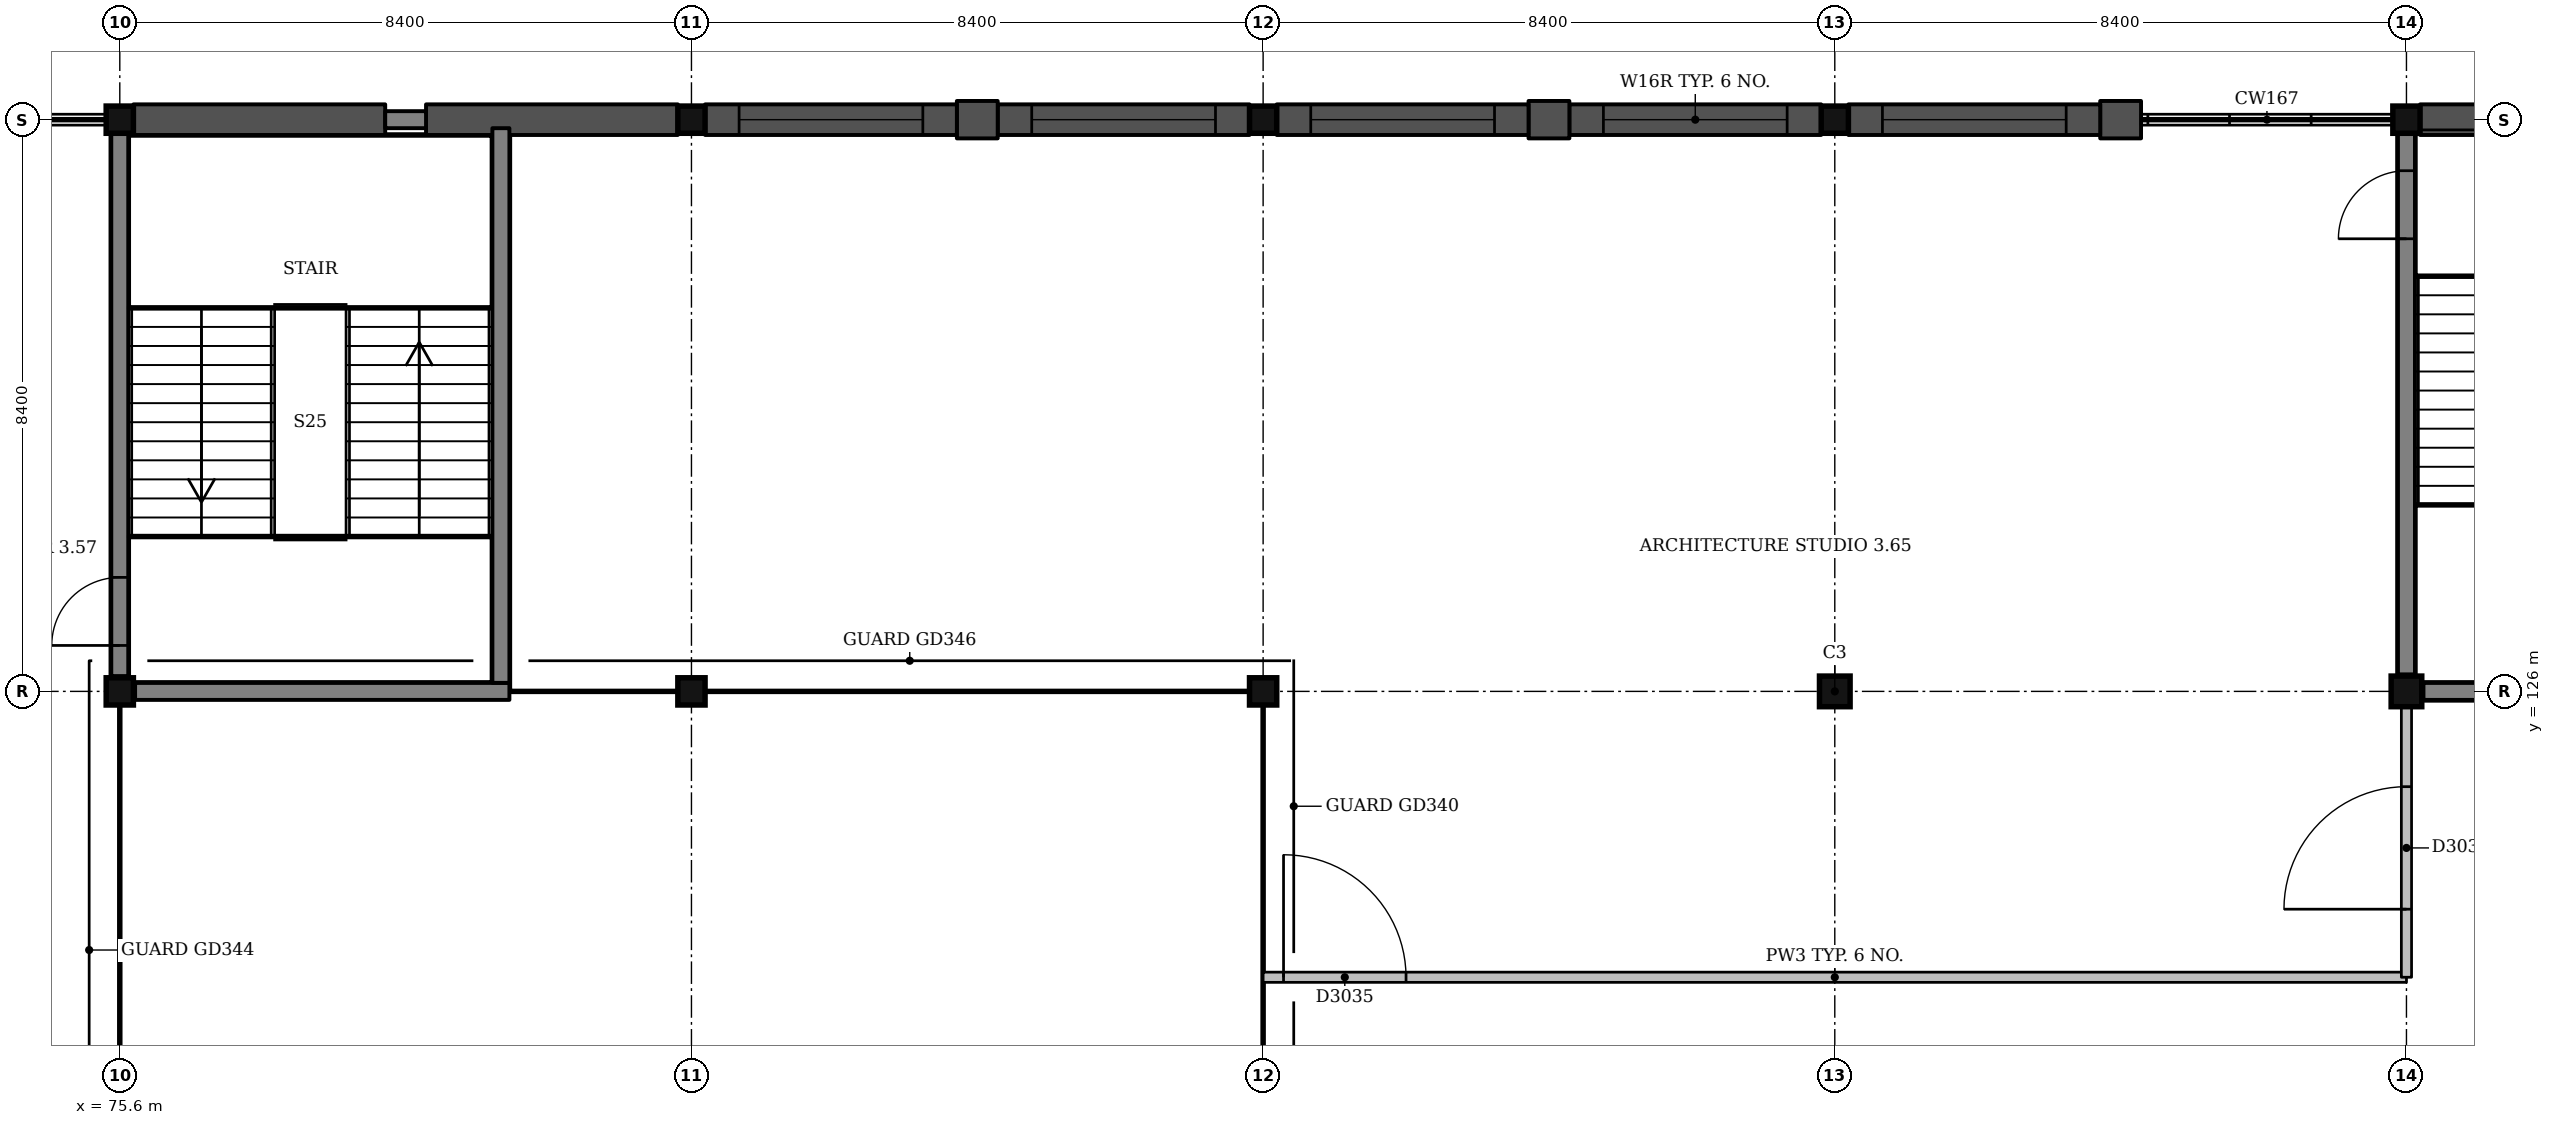
"""IFC4 building model, lengths in metres.
Left out: names, types, materials, properties, quantities, classifications, styles, units other than length and angle.
Written with IfcOpenShell. Run it as: python <this file> out.ifc"""

import sys

from ifc_helpers import new_model, si_unit, direction, frame, frame_2d, origin, origin_2d, place, context, subcontext, project, spatial, rectangle, extrude, element, fill, save


model = new_model("IFC4")
c1 = context("Model", 3, precision=1e-05, world=origin(), true_north=direction((0.0, 1.0)))
c2 = subcontext(c1, "Body", "Model", "MODEL_VIEW")
j1 = project(units=[si_unit("LENGTHUNIT", "METRE"), si_unit("PLANEANGLEUNIT", "RADIAN")], contexts=[c1])
p1 = place(None, origin())
s1 = spatial("IfcSite", under=j1, at=p1, CompositionType="ELEMENT")
p2 = place(p1, origin())
s2 = spatial("IfcBuilding", under=s1, at=p2, CompositionType="ELEMENT")
p3 = place(p2, frame((0.0, 0.0, 13.5)))
s3 = spatial("IfcBuildingStorey", under=s2, at=p3, CompositionType="ELEMENT", Elevation=13.5)
for number, where, z_axis, x_axis in (
    (1, (75.6, 126.0, 0.0), (0.0, 0.0, 1.0), (1.0, 0.0, 0.0)),
    (2, (75.6, 134.4, 0.0), (0.0, 0.0, 1.0), (1.0, 0.0, 0.0)),
    (3, (84.0, 126.0, 0.0), (0.0, 0.0, 1.0), (1.0, 0.0, 0.0)),
    (4, (84.0, 134.4, 0.0), (0.0, 0.0, 1.0), (1.0, 0.0, 0.0)),
    (5, (92.4, 126.0, 0.0), (0.0, 0.0, 1.0), (1.0, 0.0, 0.0)),
    (6, (92.4, 134.4, 0.0), (0.0, 0.0, 1.0), (1.0, 0.0, 0.0)),
):
    element("IfcColumn", number, at=place(p3, frame(where, z_axis=z_axis, x_axis=x_axis)), inside=s3, PredefinedType="COLUMN", context=c2, shape_type="SweptSolid", body=[
        extrude(rectangle(XDim=0.4, YDim=0.4, at=origin_2d()), origin(), (0.0, 0.0, 1.0), 4.5),
    ])
p4 = place(p3, frame((100.8, 126.0, 0.0), z_axis=(0.0, 0.0, 1.0), x_axis=(1.0, 0.0, 0.0)))
e7 = element("IfcColumn", 7, at=p4, inside=s3, PredefinedType="COLUMN", context=c2, shape_type="SweptSolid", body=[
    extrude(rectangle(XDim=0.45, YDim=0.45, at=origin_2d()), origin(), (0.0, 0.0, 1.0), 4.5),
])
p5 = place(p3, frame((100.8, 134.4, 0.0), z_axis=(0.0, 0.0, 1.0), x_axis=(1.0, 0.0, 0.0)))
e8 = element("IfcColumn", 8, at=p5, inside=s3, PredefinedType="COLUMN", context=c2, shape_type="SweptSolid", body=[
    extrude(rectangle(XDim=0.4, YDim=0.4, at=origin_2d()), origin(), (0.0, 0.0, 1.0), 4.5),
])
p6 = place(p3, frame((109.2, 126.0, 0.0), z_axis=(0.0, 0.0, 1.0), x_axis=(1.0, 0.0, 0.0)))
e9 = element("IfcColumn", 9, at=p6, inside=s3, PredefinedType="COLUMN", context=c2, shape_type="SweptSolid", body=[
    extrude(rectangle(XDim=0.45, YDim=0.45, at=origin_2d()), origin(), (0.0, 0.0, 1.0), 4.5),
])
p7 = place(p3, frame((109.2, 134.4, 0.0), z_axis=(0.0, 0.0, 1.0), x_axis=(1.0, 0.0, 0.0)))
e10 = element("IfcColumn", 10, at=p7, inside=s3, PredefinedType="COLUMN", context=c2, shape_type="SweptSolid", body=[
    extrude(rectangle(XDim=0.4, YDim=0.4, at=origin_2d()), origin(), (0.0, 0.0, 1.0), 4.5),
])
p8 = place(p3, frame((109.45, 126.0, 0.0), z_axis=(0.0, 0.0, 1.0), x_axis=(1.0, 0.0, 0.0)))
e11 = element("IfcWall", 11, at=p8, inside=s3, PredefinedType="SHEAR", context=c2, shape_type="SweptSolid", body=[
    extrude(rectangle(XDim=5.475, YDim=0.25, at=frame_2d((2.738, 0.0))), origin(), (0.0, 0.0, 1.0), 4.5),
])
p9 = place(p3, frame((109.2, 126.25, 0.0), z_axis=(0.0, 0.0, 1.0), x_axis=(0.0, 1.0, 0.0)))
e12 = element("IfcWall", 12, at=p9, inside=s3, PredefinedType="SHEAR", context=c2, shape_type="SweptSolid", body=[
    extrude(rectangle(XDim=7.95, YDim=0.25, at=frame_2d((3.975, 0.0))), origin(), (0.0, 0.0, 1.0), 4.5),
])
p10 = place(p9, frame((6.4, 0.0, 0.0)))
e13 = element("IfcOpeningElement", 13, at=p10, cuts=e12, PredefinedType="OPENING", context=c2, shape_type="SweptSolid", body=[
    extrude(rectangle(XDim=1.0, YDim=2.1, at=frame_2d((0.5, 1.05))), frame((0.0, 0.135, 0.0), z_axis=(0.0, -1.0, 0.0), x_axis=(1.0, 0.0, 0.0)), (0.0, 0.0, 1.0), 0.27),
])
p11 = place(p3, frame((75.825, 126.0, 0.0), z_axis=(0.0, 0.0, 1.0), x_axis=(1.0, 0.0, 0.0)))
e14 = element("IfcWall", 14, at=p11, inside=s3, PredefinedType="SHEAR", context=c2, shape_type="SweptSolid", body=[
    extrude(rectangle(XDim=5.5, YDim=0.25, at=frame_2d((2.75, 0.0))), origin(), (0.0, 0.0, 1.0), 4.5),
])
p12 = place(p3, frame((75.6, 126.225, 0.0), z_axis=(0.0, 0.0, 1.0), x_axis=(0.0, 1.0, 0.0)))
e15 = element("IfcWall", 15, at=p12, inside=s3, PredefinedType="SHEAR", context=c2, shape_type="SweptSolid", body=[
    extrude(rectangle(XDim=7.975, YDim=0.25, at=frame_2d((3.987, 0.0))), origin(), (0.0, 0.0, 1.0), 4.5),
])
p13 = place(p12, frame((0.45, 0.0, 0.0)))
e16 = element("IfcOpeningElement", 16, at=p13, cuts=e15, PredefinedType="OPENING", context=c2, shape_type="SweptSolid", body=[
    extrude(rectangle(XDim=1.0, YDim=2.1, at=frame_2d((0.5, 1.05))), frame((0.0, 0.135, 0.0), z_axis=(0.0, -1.0, 0.0), x_axis=(1.0, 0.0, 0.0)), (0.0, 0.0, 1.0), 0.27),
])
p14 = place(p3, frame((81.2, 126.125, 0.0), z_axis=(0.0, 0.0, 1.0), x_axis=(0.0, 1.0, 0.0)))
e17 = element("IfcWall", 17, at=p14, inside=s3, PredefinedType="SHEAR", context=c2, shape_type="SweptSolid", body=[
    extrude(rectangle(XDim=8.15, YDim=0.25, at=frame_2d((4.075, 0.0))), origin(), (0.0, 0.0, 1.0), 4.5),
])
p15 = place(p3, frame((113.1, 134.4, 0.0), z_axis=(0.0, 0.0, 1.0), x_axis=(-1.0, 0.0, 0.0)))
e18 = element("IfcWall", 18, at=p15, inside=s3, PredefinedType="SOLIDWALL", context=c2, shape_type="SweptSolid", body=[
    extrude(rectangle(XDim=3.7, YDim=0.45, at=frame_2d((1.85, 0.0))), origin(), (0.0, 0.0, 1.0), 3.45),
])
p16 = place(p3, frame((105.3, 134.4, 0.0), z_axis=(0.0, 0.0, 1.0), x_axis=(-1.0, 0.0, 0.0)))
e19 = element("IfcWall", 19, at=p16, inside=s3, PredefinedType="SOLIDWALL", context=c2, shape_type="SweptSolid", body=[
    extrude(rectangle(XDim=0.6, YDim=0.55, at=frame_2d((0.3, 0.0))), origin(), (0.0, 0.0, 1.0), 3.45),
])
p17 = place(p3, frame((104.7, 134.4, 0.0), z_axis=(0.0, 0.0, 1.0), x_axis=(-1.0, 0.0, 0.0)))
e20 = element("IfcWall", 20, at=p17, inside=s3, PredefinedType="SOLIDWALL", context=c2, shape_type="SweptSolid", body=[
    extrude(rectangle(XDim=3.7, YDim=0.45, at=frame_2d((1.85, 0.0))), origin(), (0.0, 0.0, 1.0), 3.45),
])
p18 = place(p17, frame((0.5, 0.0, 0.6)))
e21 = element("IfcOpeningElement", 21, at=p18, cuts=e20, PredefinedType="OPENING", context=c2, shape_type="SweptSolid", body=[
    extrude(rectangle(XDim=2.7, YDim=2.4, at=frame_2d((1.35, 1.2))), frame((0.0, 0.235, 0.0), z_axis=(0.0, -1.0, 0.0), x_axis=(1.0, 0.0, 0.0)), (0.0, 0.0, 1.0), 0.47),
])
p19 = place(p3, frame((100.6, 134.4, 0.0), z_axis=(0.0, 0.0, 1.0), x_axis=(-1.0, 0.0, 0.0)))
e22 = element("IfcWall", 22, at=p19, inside=s3, PredefinedType="SOLIDWALL", context=c2, shape_type="SweptSolid", body=[
    extrude(rectangle(XDim=3.7, YDim=0.45, at=frame_2d((1.85, 0.0))), origin(), (0.0, 0.0, 1.0), 3.45),
])
p20 = place(p19, frame((0.5, 0.0, 0.6)))
e23 = element("IfcOpeningElement", 23, at=p20, cuts=e22, PredefinedType="OPENING", context=c2, shape_type="SweptSolid", body=[
    extrude(rectangle(XDim=2.7, YDim=2.4, at=frame_2d((1.35, 1.2))), frame((0.0, 0.235, 0.0), z_axis=(0.0, -1.0, 0.0), x_axis=(1.0, 0.0, 0.0)), (0.0, 0.0, 1.0), 0.47),
])
p21 = place(p3, frame((96.9, 134.4, 0.0), z_axis=(0.0, 0.0, 1.0), x_axis=(-1.0, 0.0, 0.0)))
e24 = element("IfcWall", 24, at=p21, inside=s3, PredefinedType="SOLIDWALL", context=c2, shape_type="SweptSolid", body=[
    extrude(rectangle(XDim=0.6, YDim=0.55, at=frame_2d((0.3, 0.0))), origin(), (0.0, 0.0, 1.0), 3.45),
])
p22 = place(p3, frame((96.3, 134.4, 0.0), z_axis=(0.0, 0.0, 1.0), x_axis=(-1.0, 0.0, 0.0)))
e25 = element("IfcWall", 25, at=p22, inside=s3, PredefinedType="SOLIDWALL", context=c2, shape_type="SweptSolid", body=[
    extrude(rectangle(XDim=3.7, YDim=0.45, at=frame_2d((1.85, 0.0))), origin(), (0.0, 0.0, 1.0), 3.45),
])
p23 = place(p22, frame((0.5, 0.0, 0.6)))
e26 = element("IfcOpeningElement", 26, at=p23, cuts=e25, PredefinedType="OPENING", context=c2, shape_type="SweptSolid", body=[
    extrude(rectangle(XDim=2.7, YDim=2.4, at=frame_2d((1.35, 1.2))), frame((0.0, 0.235, 0.0), z_axis=(0.0, -1.0, 0.0), x_axis=(1.0, 0.0, 0.0)), (0.0, 0.0, 1.0), 0.47),
])
p24 = place(p3, frame((92.2, 134.4, 0.0), z_axis=(0.0, 0.0, 1.0), x_axis=(-1.0, 0.0, 0.0)))
e27 = element("IfcWall", 27, at=p24, inside=s3, PredefinedType="SOLIDWALL", context=c2, shape_type="SweptSolid", body=[
    extrude(rectangle(XDim=3.7, YDim=0.45, at=frame_2d((1.85, 0.0))), origin(), (0.0, 0.0, 1.0), 3.45),
])
p25 = place(p24, frame((0.5, 0.0, 0.6)))
e28 = element("IfcOpeningElement", 28, at=p25, cuts=e27, PredefinedType="OPENING", context=c2, shape_type="SweptSolid", body=[
    extrude(rectangle(XDim=2.7, YDim=2.4, at=frame_2d((1.35, 1.2))), frame((0.0, 0.235, 0.0), z_axis=(0.0, -1.0, 0.0), x_axis=(1.0, 0.0, 0.0)), (0.0, 0.0, 1.0), 0.47),
])
p26 = place(p3, frame((88.5, 134.4, 0.0), z_axis=(0.0, 0.0, 1.0), x_axis=(-1.0, 0.0, 0.0)))
e29 = element("IfcWall", 29, at=p26, inside=s3, PredefinedType="SOLIDWALL", context=c2, shape_type="SweptSolid", body=[
    extrude(rectangle(XDim=0.6, YDim=0.55, at=frame_2d((0.3, 0.0))), origin(), (0.0, 0.0, 1.0), 3.45),
])
p27 = place(p3, frame((87.9, 134.4, 0.0), z_axis=(0.0, 0.0, 1.0), x_axis=(-1.0, 0.0, 0.0)))
e30 = element("IfcWall", 30, at=p27, inside=s3, PredefinedType="SOLIDWALL", context=c2, shape_type="SweptSolid", body=[
    extrude(rectangle(XDim=3.7, YDim=0.45, at=frame_2d((1.85, 0.0))), origin(), (0.0, 0.0, 1.0), 3.45),
])
p28 = place(p27, frame((0.5, 0.0, 0.6)))
e31 = element("IfcOpeningElement", 31, at=p28, cuts=e30, PredefinedType="OPENING", context=c2, shape_type="SweptSolid", body=[
    extrude(rectangle(XDim=2.7, YDim=2.4, at=frame_2d((1.35, 1.2))), frame((0.0, 0.235, 0.0), z_axis=(0.0, -1.0, 0.0), x_axis=(1.0, 0.0, 0.0)), (0.0, 0.0, 1.0), 0.47),
])
for number, where, z_axis, x_axis in (
    (32, (83.8, 134.4, 0.0), (0.0, 0.0, 1.0), (-1.0, 0.0, 0.0)),
    (33, (79.5, 134.4, 0.0), (0.0, 0.0, 1.0), (-1.0, 0.0, 0.0)),
):
    element("IfcWall", number, at=place(p3, frame(where, z_axis=z_axis, x_axis=x_axis)), inside=s3, PredefinedType="SOLIDWALL", context=c2, shape_type="SweptSolid", body=[
        extrude(rectangle(XDim=3.7, YDim=0.45, at=frame_2d((1.85, 0.0))), origin(), (0.0, 0.0, 1.0), 3.45),
    ])
p29 = place(p3, frame((92.4, 121.8, 0.0), z_axis=(0.0, 0.0, 1.0), x_axis=(1.0, 0.0, 0.0)))
e34 = element("IfcWall", 34, at=p29, inside=s3, PredefinedType="PARTITIONING", context=c2, shape_type="SweptSolid", body=[
    extrude(rectangle(XDim=16.8, YDim=0.15, at=frame_2d((8.4, 0.0))), origin(), (0.0, 0.0, 1.0), 3.4),
])
p30 = place(p29, frame((0.3, 0.0, 0.0)))
e35 = element("IfcOpeningElement", 35, at=p30, cuts=e34, PredefinedType="OPENING", context=c2, shape_type="SweptSolid", body=[
    extrude(rectangle(XDim=1.8, YDim=2.1, at=frame_2d((0.9, 1.05))), frame((0.0, 0.085, 0.0), z_axis=(0.0, -1.0, 0.0), x_axis=(1.0, 0.0, 0.0)), (0.0, 0.0, 1.0), 0.17),
])
p31 = place(p3, frame((109.2, 121.8, 0.0), z_axis=(0.0, 0.0, 1.0), x_axis=(0.0, 1.0, 0.0)))
e36 = element("IfcWall", 36, at=p31, inside=s3, PredefinedType="PARTITIONING", context=c2, shape_type="SweptSolid", body=[
    extrude(rectangle(XDim=3.975, YDim=0.15, at=frame_2d((1.987, 0.0))), origin(), (0.0, 0.0, 1.0), 3.5),
])
p32 = place(p31, frame((1.0, 0.0, 0.0)))
e37 = element("IfcOpeningElement", 37, at=p32, cuts=e36, PredefinedType="OPENING", context=c2, shape_type="SweptSolid", body=[
    extrude(rectangle(XDim=1.8, YDim=2.1, at=frame_2d((0.9, 1.05))), frame((0.0, 0.085, 0.0), z_axis=(0.0, -1.0, 0.0), x_axis=(1.0, 0.0, 0.0)), (0.0, 0.0, 1.0), 0.17),
])
p33 = place(p3, frame((79.5, 134.4, 0.0), z_axis=(0.0, 0.0, 1.0), x_axis=(1.0, 0.0, 0.0)))
e38 = element("IfcWall", 38, at=p33, inside=s3, PredefinedType="SHEAR", context=c2, shape_type="SweptSolid", body=[
    extrude(rectangle(XDim=0.6, YDim=0.25, at=frame_2d((0.3, 0.0))), origin(), (0.0, 0.0, 1.0), 4.5),
])
p34 = place(p18, origin())
e39 = element("IfcWindow", 39, at=p34, inside=s3, PartitioningType="SINGLE_PANEL", PredefinedType="WINDOW", context=c2, shape_type="SweptSolid", body=[
    extrude(rectangle(XDim=2.7, YDim=2.4, at=frame_2d((1.35, 1.2))), frame((0.0, 0.135, 0.0), z_axis=(0.0, -1.0, 0.0), x_axis=(1.0, 0.0, 0.0)), (0.0, 0.0, 1.0), 0.06),
])
fill(e21, e39)
p35 = place(p20, origin())
e40 = element("IfcWindow", 40, at=p35, inside=s3, PartitioningType="SINGLE_PANEL", PredefinedType="WINDOW", context=c2, shape_type="SweptSolid", body=[
    extrude(rectangle(XDim=2.7, YDim=2.4, at=frame_2d((1.35, 1.2))), frame((0.0, 0.135, 0.0), z_axis=(0.0, -1.0, 0.0), x_axis=(1.0, 0.0, 0.0)), (0.0, 0.0, 1.0), 0.06),
])
fill(e23, e40)
p36 = place(p23, origin())
e41 = element("IfcWindow", 41, at=p36, inside=s3, PartitioningType="SINGLE_PANEL", PredefinedType="WINDOW", context=c2, shape_type="SweptSolid", body=[
    extrude(rectangle(XDim=2.7, YDim=2.4, at=frame_2d((1.35, 1.2))), frame((0.0, 0.135, 0.0), z_axis=(0.0, -1.0, 0.0), x_axis=(1.0, 0.0, 0.0)), (0.0, 0.0, 1.0), 0.06),
])
fill(e26, e41)
p37 = place(p25, origin())
e42 = element("IfcWindow", 42, at=p37, inside=s3, PartitioningType="SINGLE_PANEL", PredefinedType="WINDOW", context=c2, shape_type="SweptSolid", body=[
    extrude(rectangle(XDim=2.7, YDim=2.4, at=frame_2d((1.35, 1.2))), frame((0.0, 0.135, 0.0), z_axis=(0.0, -1.0, 0.0), x_axis=(1.0, 0.0, 0.0)), (0.0, 0.0, 1.0), 0.06),
])
fill(e28, e42)
p38 = place(p28, origin())
e43 = element("IfcWindow", 43, at=p38, inside=s3, PartitioningType="SINGLE_PANEL", PredefinedType="WINDOW", context=c2, shape_type="SweptSolid", body=[
    extrude(rectangle(XDim=2.7, YDim=2.4, at=frame_2d((1.35, 1.2))), frame((0.0, 0.135, 0.0), z_axis=(0.0, -1.0, 0.0), x_axis=(1.0, 0.0, 0.0)), (0.0, 0.0, 1.0), 0.06),
])
fill(e31, e43)
p39 = place(p32, origin())
e44 = element("IfcDoor", 44, at=p39, inside=s3, OperationType="DOUBLE_DOOR_SINGLE_SWING", PredefinedType="DOOR", context=c2, shape_type="SweptSolid", body=[
    extrude(rectangle(XDim=1.8, YDim=2.1, at=frame_2d((0.9, 1.05))), frame((0.0, 0.025, 0.0), z_axis=(0.0, -1.0, 0.0), x_axis=(1.0, 0.0, 0.0)), (0.0, 0.0, 1.0), 0.05),
])
fill(e37, e44)
p40 = place(p30, origin())
e45 = element("IfcDoor", 45, at=p40, inside=s3, OperationType="DOUBLE_DOOR_SINGLE_SWING", PredefinedType="DOOR", context=c2, shape_type="SweptSolid", body=[
    extrude(rectangle(XDim=1.8, YDim=2.1, at=frame_2d((0.9, 1.05))), frame((0.0, 0.025, 0.0), z_axis=(0.0, -1.0, 0.0), x_axis=(1.0, 0.0, 0.0)), (0.0, 0.0, 1.0), 0.05),
])
fill(e35, e45)
p41 = place(p10, origin())
e46 = element("IfcDoor", 46, at=p41, inside=s3, OperationType="SINGLE_SWING_LEFT", PredefinedType="DOOR", context=c2, shape_type="SweptSolid", body=[
    extrude(rectangle(XDim=1.0, YDim=2.1, at=frame_2d((0.5, 1.05))), frame((0.0, 0.025, 0.0), z_axis=(0.0, -1.0, 0.0), x_axis=(1.0, 0.0, 0.0)), (0.0, 0.0, 1.0), 0.05),
])
fill(e13, e46)
p42 = place(p13, origin())
e47 = element("IfcDoor", 47, at=p42, inside=s3, OperationType="SINGLE_SWING_LEFT", PredefinedType="DOOR", context=c2, shape_type="SweptSolid", body=[
    extrude(rectangle(XDim=1.0, YDim=2.1, at=frame_2d((0.5, 1.05))), frame((0.0, 0.025, 0.0), z_axis=(0.0, -1.0, 0.0), x_axis=(1.0, 0.0, 0.0)), (0.0, 0.0, 1.0), 0.05),
])
fill(e16, e47)
save(model, sys.argv[1])
